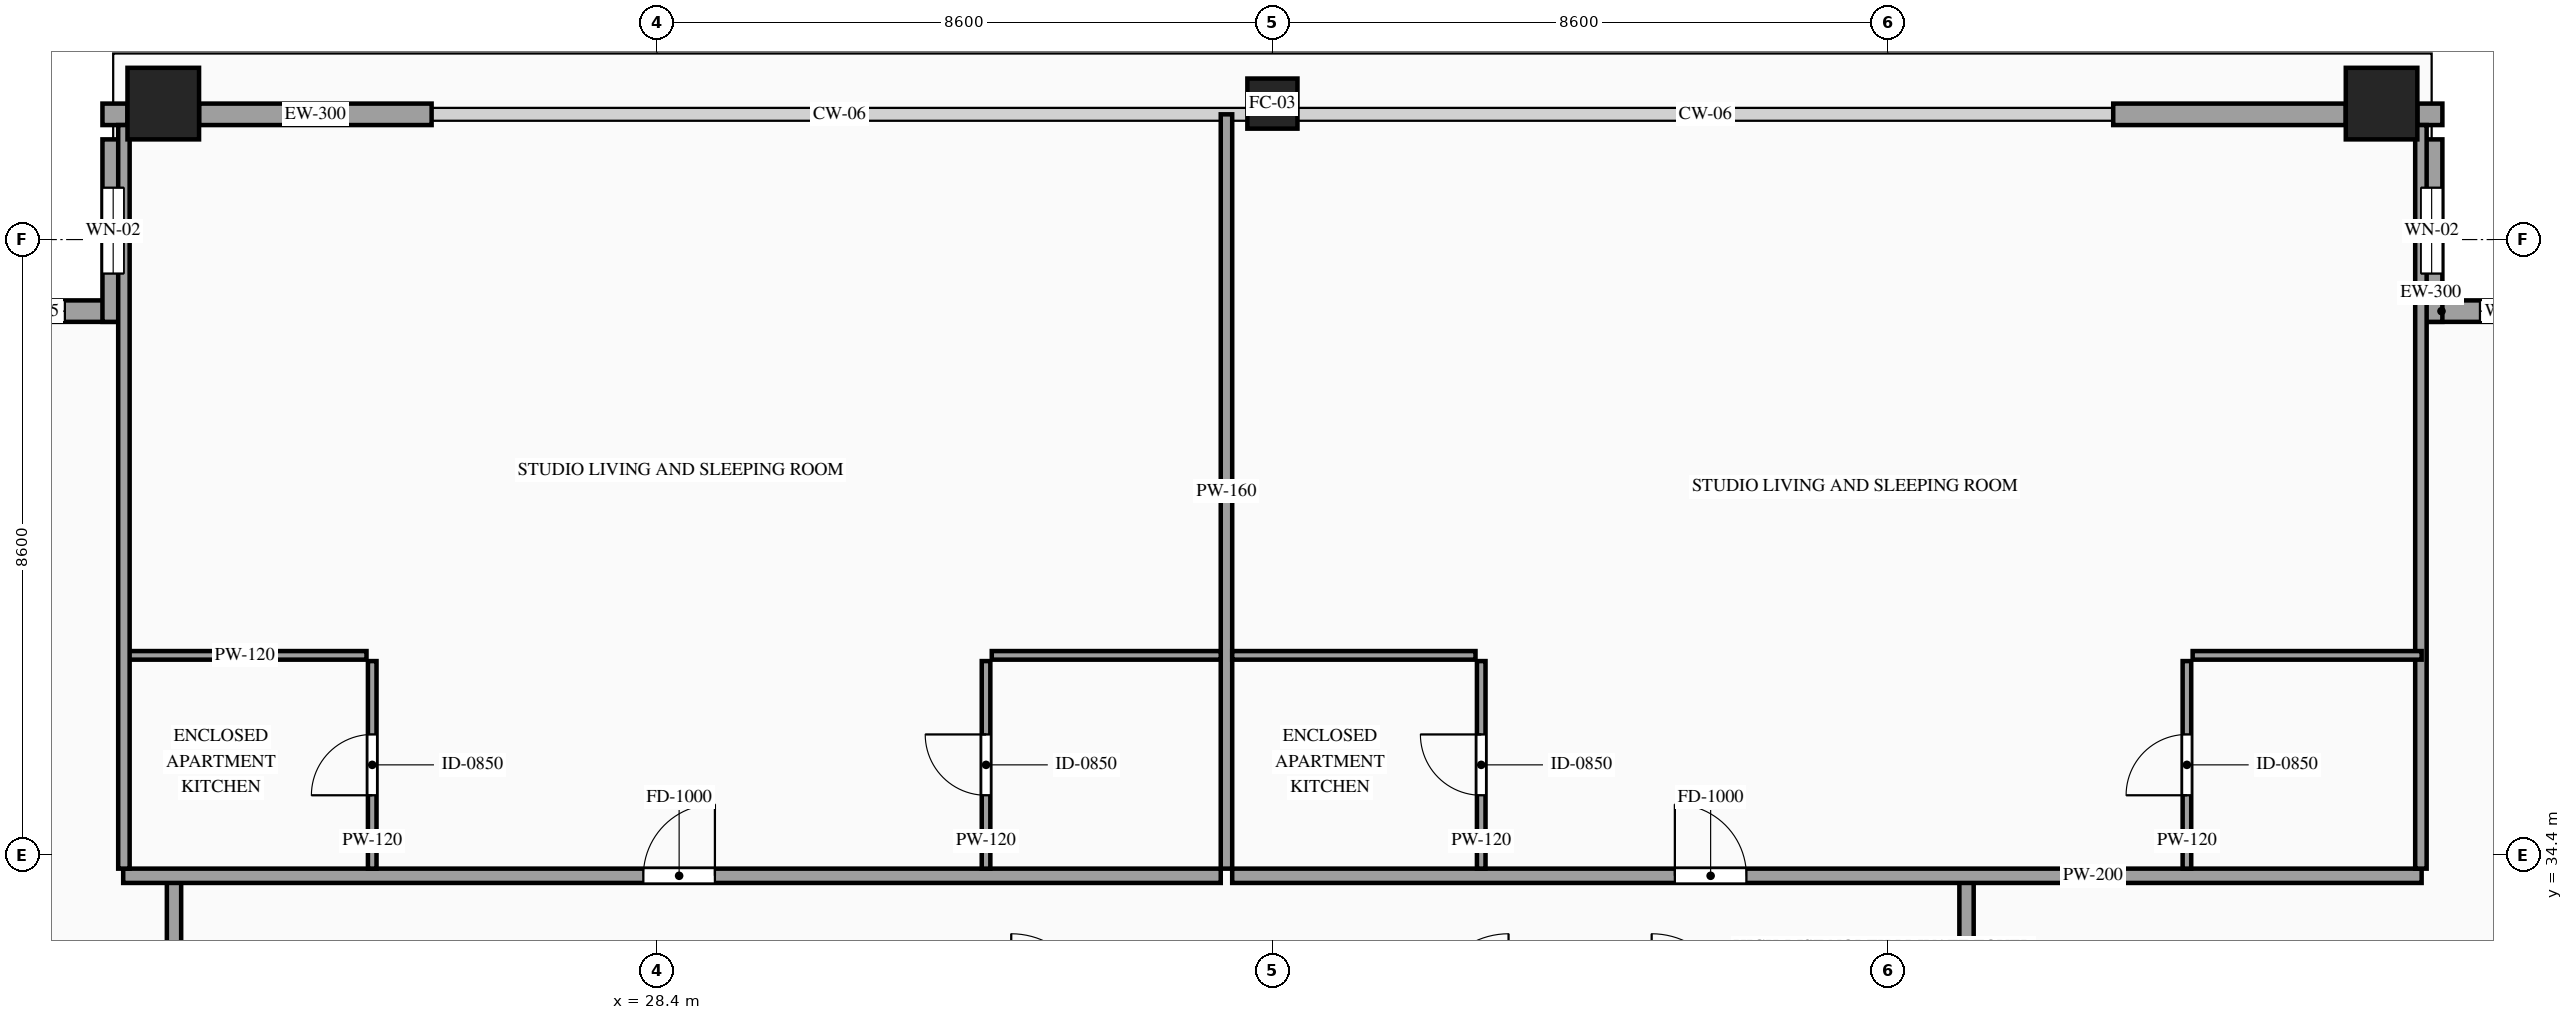
"""IFC4 building model, lengths in metres.
Left out: names, types, materials, properties, quantities, classifications, styles, units other than length and angle.
Written with IfcOpenShell. Run it as: python <this file> out.ifc"""

import sys

from ifc_helpers import new_model, si_unit, direction, frame, frame_2d, origin, origin_2d, place, context, subcontext, project, spatial, rectangle, hollow_rectangle, extrude, source, transform, mapped, element, fill, save


model = new_model("IFC4")
c1 = context("Model", 3, precision=1e-05, world=origin(), true_north=direction((0.0, 1.0)))
c2 = subcontext(c1, "Body", "Model", "MODEL_VIEW")
j1 = project(units=[si_unit("LENGTHUNIT", "METRE"), si_unit("PLANEANGLEUNIT", "RADIAN")], contexts=[c1])
p1 = place(None, origin())
s1 = spatial("IfcSite", under=j1, at=p1, CompositionType="ELEMENT")
p2 = place(p1, origin())
s2 = spatial("IfcBuilding", under=s1, at=p2, CompositionType="ELEMENT")
p3 = place(p2, frame((0.0, 0.0, 325.2)))
s3 = spatial("IfcBuildingStorey", under=s2, at=p3, CompositionType="ELEMENT", Elevation=325.2)
m1 = source(origin(), c2, "Body", "SweptSolid", [
    extrude(hollow_rectangle(XDim=1.0, YDim=1.0, WallThickness=0.048, at=origin_2d()), origin(), (0.0, 0.0, 1.0), 3.5),
])
p4 = place(p3, frame((21.5, 44.9, 0.0), z_axis=(0.0, 0.0, 1.0), x_axis=(1.0, 0.0, 0.0)))
e1 = element("IfcColumn", 1, at=p4, inside=s3, PredefinedType="COLUMN", context=c2, shape_type="MappedRepresentation", body=[
    mapped(m1, transform((0.0, 0.0, 0.0), scale=1.0)),
])
m2 = source(origin(), c2, "Body", "SweptSolid", [
    extrude(hollow_rectangle(XDim=0.7, YDim=0.7, WallThickness=0.032, at=origin_2d()), origin(), (0.0, 0.0, 1.0), 3.5),
])
p5 = place(p3, frame((37.0, 44.9, 0.0), z_axis=(0.0, 0.0, 1.0), x_axis=(1.0, 0.0, 0.0)))
e2 = element("IfcColumn", 2, at=p5, inside=s3, PredefinedType="COLUMN", context=c2, shape_type="MappedRepresentation", body=[
    mapped(m2, transform((0.0, 0.0, 0.0), scale=1.0)),
])
p6 = place(p3, frame((52.5, 44.9, 0.0), z_axis=(0.0, 0.0, 1.0), x_axis=(1.0, 0.0, 0.0)))
e3 = element("IfcColumn", 3, at=p6, inside=s3, PredefinedType="COLUMN", context=c2, shape_type="MappedRepresentation", body=[
    mapped(m1, transform((0.0, 0.0, 0.0), scale=1.0)),
])
p7 = place(p3, frame((20.95, 42.0, 0.0), z_axis=(0.0, 0.0, 1.0), x_axis=(-1.0, 0.0, 0.0)))
e4 = element("IfcWall", 4, at=p7, inside=s3, PredefinedType="SOLIDWALL", context=c2, shape_type="SweptSolid", body=[
    extrude(rectangle(XDim=2.55, YDim=0.3, at=frame_2d((1.275, 0.0))), origin(), (0.0, 0.0, 1.0), 3.28),
])
p8 = place(p7, frame((0.825, 0.0, 0.85)))
e5 = element("IfcOpeningElement", 5, at=p8, cuts=e4, PredefinedType="OPENING", context=c2, shape_type="SweptSolid", body=[
    extrude(rectangle(XDim=0.9, YDim=1.5, at=frame_2d((0.45, 0.75))), frame((0.0, 0.165, 0.0), z_axis=(0.0, -1.0, 0.0), x_axis=(1.0, 0.0, 0.0)), (0.0, 0.0, 1.0), 0.33),
])
p9 = place(p3, frame((20.8, 44.4, 0.0), z_axis=(0.0, 0.0, 1.0), x_axis=(0.0, -1.0, 0.0)))
e6 = element("IfcWall", 6, at=p9, inside=s3, PredefinedType="SOLIDWALL", context=c2, shape_type="SweptSolid", body=[
    extrude(rectangle(XDim=2.55, YDim=0.3, at=frame_2d((1.275, 0.0))), origin(), (0.0, 0.0, 1.0), 3.28),
])
p10 = place(p9, frame((0.675, 0.0, 0.85)))
e7 = element("IfcOpeningElement", 7, at=p10, cuts=e6, PredefinedType="OPENING", context=c2, shape_type="SweptSolid", body=[
    extrude(rectangle(XDim=1.2, YDim=2.1, at=frame_2d((0.6, 1.05))), frame((0.0, 0.165, 0.0), z_axis=(0.0, -1.0, 0.0), x_axis=(1.0, 0.0, 0.0)), (0.0, 0.0, 1.0), 0.33),
])
p11 = place(p3, frame((55.6, 42.0, 0.0), z_axis=(0.0, 0.0, 1.0), x_axis=(-1.0, 0.0, 0.0)))
e8 = element("IfcWall", 8, at=p11, inside=s3, PredefinedType="SOLIDWALL", context=c2, shape_type="SweptSolid", body=[
    extrude(rectangle(XDim=2.55, YDim=0.3, at=frame_2d((1.275, 0.0))), origin(), (0.0, 0.0, 1.0), 3.28),
])
p12 = place(p11, frame((0.825, 0.0, 0.85)))
e9 = element("IfcOpeningElement", 9, at=p12, cuts=e8, PredefinedType="OPENING", context=c2, shape_type="SweptSolid", body=[
    extrude(rectangle(XDim=0.9, YDim=1.5, at=frame_2d((0.45, 0.75))), frame((0.0, 0.165, 0.0), z_axis=(0.0, -1.0, 0.0), x_axis=(1.0, 0.0, 0.0)), (0.0, 0.0, 1.0), 0.33),
])
p13 = place(p3, frame((53.2, 41.85, 0.0), z_axis=(0.0, 0.0, 1.0), x_axis=(0.0, 1.0, 0.0)))
e10 = element("IfcWall", 10, at=p13, inside=s3, PredefinedType="SOLIDWALL", context=c2, shape_type="SweptSolid", body=[
    extrude(rectangle(XDim=2.55, YDim=0.3, at=frame_2d((1.275, 0.0))), origin(), (0.0, 0.0, 1.0), 3.28),
])
p14 = place(p13, frame((0.675, 0.0, 0.85)))
e11 = element("IfcOpeningElement", 11, at=p14, cuts=e10, PredefinedType="OPENING", context=c2, shape_type="SweptSolid", body=[
    extrude(rectangle(XDim=1.2, YDim=2.1, at=frame_2d((0.6, 1.05))), frame((0.0, 0.165, 0.0), z_axis=(0.0, -1.0, 0.0), x_axis=(1.0, 0.0, 0.0)), (0.0, 0.0, 1.0), 0.33),
])
m3 = source(origin(), c2, "Body", "SweptSolid", [
    extrude(rectangle(XDim=0.35, YDim=0.3, at=frame_2d((0.175, 0.0))), origin(), (0.0, 0.0, 1.0), 3.28),
])
for number, where, z_axis, x_axis in (
    (12, (20.65, 44.75, 0.0), (0.0, 0.0, 1.0), (1.0, 0.0, 0.0)),
    (13, (53.0, 44.75, 0.0), (0.0, 0.0, 1.0), (1.0, 0.0, 0.0)),
):
    element("IfcWall", number, at=place(p3, frame(where, z_axis=z_axis, x_axis=x_axis)), inside=s3, PredefinedType="SOLIDWALL", context=c2, shape_type="MappedRepresentation", body=[
        mapped(m3, transform((0.0, 0.0, 0.0), scale=1.0)),
    ])
m4 = source(origin(), c2, "Body", "SweptSolid", [
    extrude(rectangle(XDim=3.25, YDim=0.3, at=frame_2d((1.625, 0.0))), origin(), (0.0, 0.0, 1.0), 2.885),
])
for number, where, z_axis, x_axis in (
    (14, (22.0, 44.75, 0.0), (0.0, 0.0, 1.0), (1.0, 0.0, 0.0)),
    (15, (48.75, 44.75, 0.0), (0.0, 0.0, 1.0), (1.0, 0.0, 0.0)),
):
    element("IfcWall", number, at=place(p3, frame(where, z_axis=z_axis, x_axis=x_axis)), inside=s3, PredefinedType="SOLIDWALL", context=c2, shape_type="MappedRepresentation", body=[
        mapped(m4, transform((0.0, 0.0, 0.0), scale=1.0)),
    ])
m5 = source(origin(), c2, "Body", "SweptSolid", [
    extrude(rectangle(XDim=1.7, YDim=0.2, at=frame_2d((0.85, 0.0))), origin(), (0.0, 0.0, 1.0), 3.28),
])
for number, where, z_axis, x_axis in (
    (16, (21.65, 32.35, 0.0), (0.0, 0.0, 1.0), (0.0, 1.0, 0.0)),
    (17, (46.7, 32.35, 0.0), (0.0, 0.0, 1.0), (0.0, 1.0, 0.0)),
):
    element("IfcWall", number, at=place(p3, frame(where, z_axis=z_axis, x_axis=x_axis)), inside=s3, PredefinedType="PARTITIONING", context=c2, shape_type="MappedRepresentation", body=[
        mapped(m5, transform((0.0, 0.0, 0.0), scale=1.0)),
    ])
p15 = place(p3, frame((20.94, 34.11, 0.0), z_axis=(0.0, 0.0, 1.0), x_axis=(1.0, 0.0, 0.0)))
e18 = element("IfcWall", 18, at=p15, inside=s3, PredefinedType="PARTITIONING", context=c2, shape_type="SweptSolid", body=[
    extrude(rectangle(XDim=15.338, YDim=0.2, at=frame_2d((7.669, 0.0))), origin(), (0.0, 0.0, 1.0), 3.28),
])
p16 = place(p15, frame((7.269, 0.0, 0.0)))
e19 = element("IfcOpeningElement", 19, at=p16, cuts=e18, PredefinedType="OPENING", context=c2, shape_type="SweptSolid", body=[
    extrude(rectangle(XDim=1.0, YDim=2.2, at=frame_2d((0.5, 1.1))), frame((0.0, 0.115, 0.0), z_axis=(0.0, -1.0, 0.0), x_axis=(1.0, 0.0, 0.0)), (0.0, 0.0, 1.0), 0.23),
])
m6 = source(origin(), c2, "Body", "SweptSolid", [
    extrude(rectangle(XDim=10.54, YDim=0.16, at=frame_2d((5.27, 0.0))), origin(), (0.0, 0.0, 1.0), 3.28),
])
p17 = place(p3, frame((36.358, 34.21, 0.0), z_axis=(0.0, 0.0, 1.0), x_axis=(0.0, 1.0, 0.0)))
e20 = element("IfcWall", 20, at=p17, inside=s3, PredefinedType="PARTITIONING", context=c2, shape_type="MappedRepresentation", body=[
    mapped(m6, transform((0.0, 0.0, 0.0), scale=1.0)),
])
m7 = source(origin(), c2, "Body", "SweptSolid", [
    extrude(rectangle(XDim=3.4, YDim=0.12, at=frame_2d((1.7, 0.0))), origin(), (0.0, 0.0, 1.0), 3.28),
])
p18 = place(p3, frame((20.94, 37.19, 0.0), z_axis=(0.0, 0.0, 1.0), x_axis=(1.0, 0.0, 0.0)))
e21 = element("IfcWall", 21, at=p18, inside=s3, PredefinedType="PARTITIONING", context=c2, shape_type="MappedRepresentation", body=[
    mapped(m7, transform((0.0, 0.0, 0.0), scale=1.0)),
])
p19 = place(p3, frame((24.42, 34.21, 0.0), z_axis=(0.0, 0.0, 1.0), x_axis=(0.0, 1.0, 0.0)))
e22 = element("IfcWall", 22, at=p19, inside=s3, PredefinedType="PARTITIONING", context=c2, shape_type="SweptSolid", body=[
    extrude(rectangle(XDim=2.9, YDim=0.12, at=frame_2d((1.45, 0.0))), origin(), (0.0, 0.0, 1.0), 3.28),
])
p20 = place(p19, frame((1.025, 0.0, 0.0)))
e23 = element("IfcOpeningElement", 23, at=p20, cuts=e22, PredefinedType="OPENING", context=c2, shape_type="SweptSolid", body=[
    extrude(rectangle(XDim=0.85, YDim=2.1, at=frame_2d((0.425, 1.05))), frame((0.0, 0.075, 0.0), z_axis=(0.0, -1.0, 0.0), x_axis=(1.0, 0.0, 0.0)), (0.0, 0.0, 1.0), 0.15),
])
m8 = source(origin(), c2, "Body", "SweptSolid", [
    extrude(rectangle(XDim=3.2, YDim=0.12, at=frame_2d((1.6, 0.0))), origin(), (0.0, 0.0, 1.0), 3.28),
])
p21 = place(p3, frame((33.078, 37.19, 0.0), z_axis=(0.0, 0.0, 1.0), x_axis=(1.0, 0.0, 0.0)))
e24 = element("IfcWall", 24, at=p21, inside=s3, PredefinedType="PARTITIONING", context=c2, shape_type="MappedRepresentation", body=[
    mapped(m8, transform((0.0, 0.0, 0.0), scale=1.0)),
])
p22 = place(p3, frame((32.998, 34.21, 0.0), z_axis=(0.0, 0.0, 1.0), x_axis=(0.0, 1.0, 0.0)))
e25 = element("IfcWall", 25, at=p22, inside=s3, PredefinedType="PARTITIONING", context=c2, shape_type="SweptSolid", body=[
    extrude(rectangle(XDim=2.9, YDim=0.12, at=frame_2d((1.45, 0.0))), origin(), (0.0, 0.0, 1.0), 3.28),
])
p23 = place(p22, frame((1.025, 0.0, 0.0)))
e26 = element("IfcOpeningElement", 26, at=p23, cuts=e25, PredefinedType="OPENING", context=c2, shape_type="SweptSolid", body=[
    extrude(rectangle(XDim=0.85, YDim=2.1, at=frame_2d((0.425, 1.05))), frame((0.0, 0.075, 0.0), z_axis=(0.0, -1.0, 0.0), x_axis=(1.0, 0.0, 0.0)), (0.0, 0.0, 1.0), 0.15),
])
p24 = place(p3, frame((36.438, 34.11, 0.0), z_axis=(0.0, 0.0, 1.0), x_axis=(1.0, 0.0, 0.0)))
e27 = element("IfcWall", 27, at=p24, inside=s3, PredefinedType="PARTITIONING", context=c2, shape_type="SweptSolid", body=[
    extrude(rectangle(XDim=16.622, YDim=0.2, at=frame_2d((8.311, 0.0))), origin(), (0.0, 0.0, 1.0), 3.28),
])
p25 = place(p24, frame((6.186, 0.0, 0.0)))
e28 = element("IfcOpeningElement", 28, at=p25, cuts=e27, PredefinedType="OPENING", context=c2, shape_type="SweptSolid", body=[
    extrude(rectangle(XDim=1.0, YDim=2.2, at=frame_2d((0.5, 1.1))), frame((0.0, 0.115, 0.0), z_axis=(0.0, -1.0, 0.0), x_axis=(1.0, 0.0, 0.0)), (0.0, 0.0, 1.0), 0.23),
])
m9 = source(origin(), c2, "Body", "SweptSolid", [
    extrude(rectangle(XDim=10.39, YDim=0.16, at=frame_2d((5.195, 0.0))), origin(), (0.0, 0.0, 1.0), 3.28),
])
for number, where, z_axis, x_axis in (
    (29, (20.95, 34.21, 0.0), (0.0, 0.0, 1.0), (0.0, 1.0, 0.0)),
    (30, (53.05, 34.21, 0.0), (0.0, 0.0, 1.0), (0.0, 1.0, 0.0)),
):
    element("IfcWall", number, at=place(p3, frame(where, z_axis=z_axis, x_axis=x_axis)), inside=s3, PredefinedType="PARTITIONING", context=c2, shape_type="MappedRepresentation", body=[
        mapped(m9, transform((0.0, 0.0, 0.0), scale=1.0)),
    ])
m10 = source(origin(), c2, "Body", "SweptSolid", [
    extrude(rectangle(XDim=3.4, YDim=0.12, at=frame_2d((1.7, 0.0))), origin(), (0.0, 0.0, 1.0), 3.28),
])
p26 = place(p3, frame((36.438, 37.19, 0.0), z_axis=(0.0, 0.0, 1.0), x_axis=(1.0, 0.0, 0.0)))
e31 = element("IfcWall", 31, at=p26, inside=s3, PredefinedType="PARTITIONING", context=c2, shape_type="MappedRepresentation", body=[
    mapped(m10, transform((0.0, 0.0, 0.0), scale=1.0)),
])
p27 = place(p3, frame((39.918, 34.21, 0.0), z_axis=(0.0, 0.0, 1.0), x_axis=(0.0, 1.0, 0.0)))
e32 = element("IfcWall", 32, at=p27, inside=s3, PredefinedType="PARTITIONING", context=c2, shape_type="SweptSolid", body=[
    extrude(rectangle(XDim=2.9, YDim=0.12, at=frame_2d((1.45, 0.0))), origin(), (0.0, 0.0, 1.0), 3.28),
])
p28 = place(p27, frame((1.025, 0.0, 0.0)))
e33 = element("IfcOpeningElement", 33, at=p28, cuts=e32, PredefinedType="OPENING", context=c2, shape_type="SweptSolid", body=[
    extrude(rectangle(XDim=0.85, YDim=2.1, at=frame_2d((0.425, 1.05))), frame((0.0, 0.075, 0.0), z_axis=(0.0, -1.0, 0.0), x_axis=(1.0, 0.0, 0.0)), (0.0, 0.0, 1.0), 0.15),
])
m11 = source(origin(), c2, "Body", "SweptSolid", [
    extrude(rectangle(XDim=3.2, YDim=0.12, at=frame_2d((1.6, 0.0))), origin(), (0.0, 0.0, 1.0), 3.28),
])
p29 = place(p3, frame((49.86, 37.19, 0.0), z_axis=(0.0, 0.0, 1.0), x_axis=(1.0, 0.0, 0.0)))
e34 = element("IfcWall", 34, at=p29, inside=s3, PredefinedType="PARTITIONING", context=c2, shape_type="MappedRepresentation", body=[
    mapped(m11, transform((0.0, 0.0, 0.0), scale=1.0)),
])
p30 = place(p3, frame((49.78, 34.21, 0.0), z_axis=(0.0, 0.0, 1.0), x_axis=(0.0, 1.0, 0.0)))
e35 = element("IfcWall", 35, at=p30, inside=s3, PredefinedType="PARTITIONING", context=c2, shape_type="SweptSolid", body=[
    extrude(rectangle(XDim=2.9, YDim=0.12, at=frame_2d((1.45, 0.0))), origin(), (0.0, 0.0, 1.0), 3.28),
])
p31 = place(p30, frame((1.025, 0.0, 0.0)))
e36 = element("IfcOpeningElement", 36, at=p31, cuts=e35, PredefinedType="OPENING", context=c2, shape_type="SweptSolid", body=[
    extrude(rectangle(XDim=0.85, YDim=2.1, at=frame_2d((0.425, 1.05))), frame((0.0, 0.075, 0.0), z_axis=(0.0, -1.0, 0.0), x_axis=(1.0, 0.0, 0.0)), (0.0, 0.0, 1.0), 0.15),
])
m12 = source(origin(), c2, "Body", "SweptSolid", [
    extrude(rectangle(XDim=0.9, YDim=1.5, at=frame_2d((0.45, 0.75))), frame((0.0, 0.03, 0.0), z_axis=(0.0, -1.0, 0.0), x_axis=(1.0, 0.0, 0.0)), (0.0, 0.0, 1.0), 0.06),
])
p32 = place(p8, origin())
e37 = element("IfcWindow", 37, at=p32, inside=s3, PartitioningType="SINGLE_PANEL", PredefinedType="WINDOW", context=c2, shape_type="MappedRepresentation", body=[
    mapped(m12, transform((0.0, 0.0, 0.0), scale=1.0)),
])
fill(e5, e37)
m13 = source(origin(), c2, "Body", "SweptSolid", [
    extrude(rectangle(XDim=1.2, YDim=2.1, at=frame_2d((0.6, 1.05))), frame((0.0, 0.03, 0.0), z_axis=(0.0, -1.0, 0.0), x_axis=(1.0, 0.0, 0.0)), (0.0, 0.0, 1.0), 0.06),
])
p33 = place(p10, origin())
e38 = element("IfcWindow", 38, at=p33, inside=s3, PartitioningType="SINGLE_PANEL", PredefinedType="WINDOW", context=c2, shape_type="MappedRepresentation", body=[
    mapped(m13, transform((0.0, 0.0, 0.0), scale=1.0)),
])
fill(e7, e38)
p34 = place(p12, origin())
e39 = element("IfcWindow", 39, at=p34, inside=s3, PartitioningType="SINGLE_PANEL", PredefinedType="WINDOW", context=c2, shape_type="MappedRepresentation", body=[
    mapped(m12, transform((0.0, 0.0, 0.0), scale=1.0)),
])
fill(e9, e39)
p35 = place(p14, origin())
e40 = element("IfcWindow", 40, at=p35, inside=s3, PartitioningType="SINGLE_PANEL", PredefinedType="WINDOW", context=c2, shape_type="MappedRepresentation", body=[
    mapped(m13, transform((0.0, 0.0, 0.0), scale=1.0)),
])
fill(e11, e40)
m14 = source(origin(), c2, "Body", "SweptSolid", [
    extrude(rectangle(XDim=1.0, YDim=2.2, at=frame_2d((0.5, 1.1))), frame((0.0, 0.025, 0.0), z_axis=(0.0, -1.0, 0.0), x_axis=(1.0, 0.0, 0.0)), (0.0, 0.0, 1.0), 0.05),
])
p36 = place(p16, origin())
e41 = element("IfcDoor", 41, at=p36, inside=s3, OperationType="SINGLE_SWING_RIGHT", PredefinedType="DOOR", context=c2, shape_type="MappedRepresentation", body=[
    mapped(m14, transform((0.0, 0.0, 0.0), scale=1.0)),
])
fill(e19, e41)
m15 = source(origin(), c2, "Body", "SweptSolid", [
    extrude(rectangle(XDim=0.85, YDim=2.1, at=frame_2d((0.425, 1.05))), frame((0.0, 0.025, 0.0), z_axis=(0.0, -1.0, 0.0), x_axis=(1.0, 0.0, 0.0)), (0.0, 0.0, 1.0), 0.05),
])
p37 = place(p20, origin())
e42 = element("IfcDoor", 42, at=p37, inside=s3, OperationType="SINGLE_SWING_LEFT", PredefinedType="DOOR", context=c2, shape_type="MappedRepresentation", body=[
    mapped(m15, transform((0.0, 0.0, 0.0), scale=1.0)),
])
fill(e23, e42)
p38 = place(p23, origin())
e43 = element("IfcDoor", 43, at=p38, inside=s3, OperationType="SINGLE_SWING_RIGHT", PredefinedType="DOOR", context=c2, shape_type="MappedRepresentation", body=[
    mapped(m15, transform((0.0, 0.0, 0.0), scale=1.0)),
])
fill(e26, e43)
p39 = place(p25, origin())
e44 = element("IfcDoor", 44, at=p39, inside=s3, OperationType="SINGLE_SWING_LEFT", PredefinedType="DOOR", context=c2, shape_type="MappedRepresentation", body=[
    mapped(m14, transform((0.0, 0.0, 0.0), scale=1.0)),
])
fill(e28, e44)
p40 = place(p28, origin())
e45 = element("IfcDoor", 45, at=p40, inside=s3, OperationType="SINGLE_SWING_RIGHT", PredefinedType="DOOR", context=c2, shape_type="MappedRepresentation", body=[
    mapped(m15, transform((0.0, 0.0, 0.0), scale=1.0)),
])
fill(e33, e45)
p41 = place(p31, origin())
e46 = element("IfcDoor", 46, at=p41, inside=s3, OperationType="SINGLE_SWING_LEFT", PredefinedType="DOOR", context=c2, shape_type="MappedRepresentation", body=[
    mapped(m15, transform((0.0, 0.0, 0.0), scale=1.0)),
])
fill(e36, e46)
save(model, sys.argv[1])
